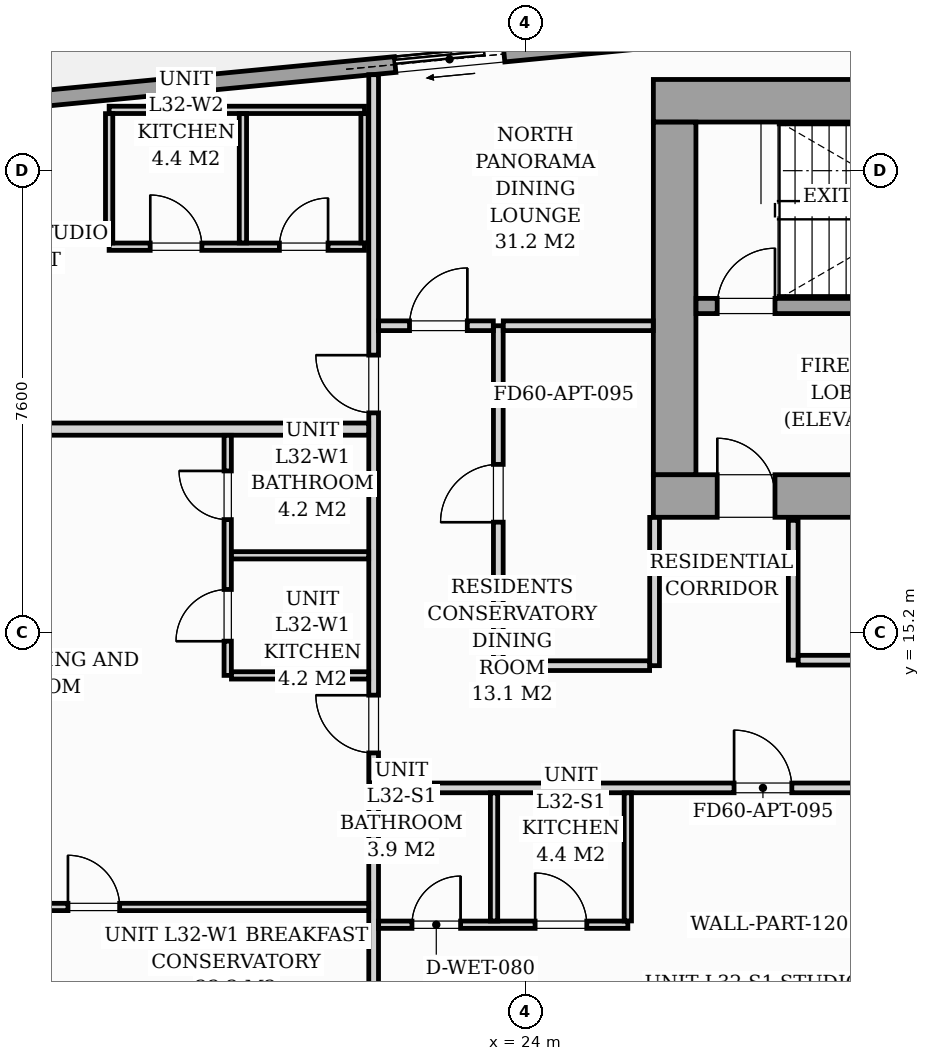
"""IFC4 building model, lengths in metres.
Left out: names, types, materials, properties, quantities, classifications, styles, units other than length and angle.
Written with IfcOpenShell. Run it as: python <this file> out.ifc"""

import sys

from ifc_helpers import new_model, si_unit, direction, frame, frame_2d, origin, origin_2d, place, context, subcontext, project, spatial, rectangle, i_section, extrude, source, transform, mapped, element, fill, save


model = new_model("IFC4")
c1 = context("Model", 3, precision=1e-05, world=origin(), true_north=direction((0.0, 1.0)))
c2 = subcontext(c1, "Body", "Model", "MODEL_VIEW")
j1 = project(units=[si_unit("LENGTHUNIT", "METRE"), si_unit("PLANEANGLEUNIT", "RADIAN")], contexts=[c1])
p1 = place(None, origin())
s1 = spatial("IfcSite", under=j1, at=p1, CompositionType="ELEMENT")
p2 = place(p1, origin())
s2 = spatial("IfcBuilding", under=s1, at=p2, CompositionType="ELEMENT")
p3 = place(p2, frame((0.0, 0.0, 113.0)))
s3 = spatial("IfcBuildingStorey", under=s2, at=p3, CompositionType="ELEMENT", Elevation=113.0)
m1 = source(origin(), c2, "Body", "SweptSolid", [
    extrude(i_section(OverallWidth=0.427, OverallDepth=0.483, WebThickness=0.051, FlangeThickness=0.082, FilletRadius=0.018, at=origin_2d()), origin(), (0.0, 0.0, 1.0), 3.196),
])
for number, where, z_axis, x_axis in (
    (1, (26.4, 17.4, 0.002), (0.0, 0.0, 1.0), (1.0, 0.0, 0.0)),
    (2, (26.4, 24.0, 0.002), (0.0, 0.0, 1.0), (1.0, 0.0, 0.0)),
):
    element("IfcColumn", number, at=place(p3, frame(where, z_axis=z_axis, x_axis=x_axis)), inside=s3, PredefinedType="PILASTER", context=c2, shape_type="MappedRepresentation", body=[
        mapped(m1, transform((0.0, 0.0, 0.0), scale=1.0)),
    ])
p4 = place(p3, frame((11.08, 23.508, 0.0), z_axis=(0.0, 0.0, 1.0), x_axis=(0.995396638587, 0.095841180552, 0.0)))
e3 = element("IfcWall", 3, at=p4, inside=s3, PredefinedType="STANDARD", context=c2, shape_type="SweptSolid", body=[
    extrude(rectangle(XDim=19.11, YDim=0.26, at=frame_2d((9.555, 0.0))), origin(), (0.0, 0.0, 1.0), 2.94),
])
p5 = place(p4, frame((10.823, 0.0, 0.0)))
e4 = element("IfcOpeningElement", 4, at=p5, cuts=e3, PredefinedType="OPENING", context=c2, shape_type="SweptSolid", body=[
    extrude(rectangle(XDim=1.8, YDim=2.06, at=frame_2d((0.9, 1.03))), frame((0.0, 0.14, 0.0), z_axis=(0.0, -1.0, 0.0), x_axis=(1.0, 0.0, 0.0)), (0.0, 0.0, 1.0), 0.28),
])
p6 = place(p4, frame((2.05, 0.0, 0.65)))
e5 = element("IfcOpeningElement", 5, at=p6, cuts=e3, PredefinedType="OPENING", context=c2, shape_type="SweptSolid", body=[
    extrude(rectangle(XDim=1.6, YDim=1.5, at=frame_2d((0.8, 0.75))), frame((0.0, 0.14, 0.0), z_axis=(0.0, -1.0, 0.0), x_axis=(1.0, 0.0, 0.0)), (0.0, 0.0, 1.0), 0.28),
])
p7 = place(p3, frame((26.1, 17.45, 0.0), z_axis=(0.0, 0.0, 1.0), x_axis=(1.0, 0.0, 0.0)))
e6 = element("IfcWall", 6, at=p7, inside=s3, PredefinedType="SHEAR", context=c2, shape_type="SweptSolid", body=[
    extrude(rectangle(XDim=19.8, YDim=0.7, at=frame_2d((9.9, 0.0))), origin(), (0.0, 0.0, 1.0), 3.2),
])
p8 = place(p7, frame((1.05, 0.0, 0.0)))
e7 = element("IfcOpeningElement", 7, at=p8, cuts=e6, PredefinedType="OPENING", context=c2, shape_type="SweptSolid", body=[
    extrude(rectangle(XDim=0.95, YDim=2.06, at=frame_2d((0.475, 1.03))), frame((0.0, 0.36, 0.0), z_axis=(0.0, -1.0, 0.0), x_axis=(1.0, 0.0, 0.0)), (0.0, 0.0, 1.0), 0.72),
])
p9 = place(p7, frame((9.48, 0.0, 0.0)))
e8 = element("IfcOpeningElement", 8, at=p9, cuts=e6, PredefinedType="OPENING", context=c2, shape_type="SweptSolid", body=[
    extrude(rectangle(XDim=0.85, YDim=2.0, at=frame_2d((0.425, 1.0))), frame((0.0, 0.36, 0.0), z_axis=(0.0, -1.0, 0.0), x_axis=(1.0, 0.0, 0.0)), (0.0, 0.0, 1.0), 0.72),
])
p10 = place(p7, frame((17.65, 0.0, 0.0)))
e9 = element("IfcOpeningElement", 9, at=p10, cuts=e6, PredefinedType="OPENING", context=c2, shape_type="SweptSolid", body=[
    extrude(rectangle(XDim=0.95, YDim=2.06, at=frame_2d((0.475, 1.03))), frame((0.0, 0.36, 0.0), z_axis=(0.0, -1.0, 0.0), x_axis=(1.0, 0.0, 0.0)), (0.0, 0.0, 1.0), 0.72),
])
p11 = place(p3, frame((26.1, 23.95, 0.0), z_axis=(0.0, 0.0, 1.0), x_axis=(1.0, 0.0, 0.0)))
e10 = element("IfcWall", 10, at=p11, inside=s3, PredefinedType="SHEAR", context=c2, shape_type="SweptSolid", body=[
    extrude(rectangle(XDim=19.8, YDim=0.7, at=frame_2d((9.9, 0.0))), origin(), (0.0, 0.0, 1.0), 3.2),
])
p12 = place(p3, frame((26.45, 17.802, 0.0), z_axis=(0.0, 0.0, 1.0), x_axis=(0.0, 1.0, 0.0)))
e11 = element("IfcWall", 11, at=p12, inside=s3, PredefinedType="SHEAR", context=c2, shape_type="SweptSolid", body=[
    extrude(rectangle(XDim=5.796, YDim=0.7, at=frame_2d((2.898, 0.0))), origin(), (0.0, 0.0, 1.0), 3.2),
])
p13 = place(p3, frame((26.802, 20.575, 0.0), z_axis=(0.0, 0.0, 1.0), x_axis=(1.0, 0.0, 0.0)))
e12 = element("IfcWall", 12, at=p13, inside=s3, PredefinedType="SOLIDWALL", context=c2, shape_type="SweptSolid", body=[
    extrude(rectangle(XDim=8.148, YDim=0.25, at=frame_2d((4.074, 0.0))), origin(), (0.0, 0.0, 1.0), 3.2),
])
p14 = place(p13, frame((0.348, 0.0, 0.0)))
e13 = element("IfcOpeningElement", 13, at=p14, cuts=e12, PredefinedType="OPENING", context=c2, shape_type="SweptSolid", body=[
    extrude(rectangle(XDim=0.95, YDim=2.06, at=frame_2d((0.475, 1.03))), frame((0.0, 0.135, 0.0), z_axis=(0.0, -1.0, 0.0), x_axis=(1.0, 0.0, 0.0)), (0.0, 0.0, 1.0), 0.27),
])
p15 = place(p3, frame((28.4, 14.75, 0.0), z_axis=(0.0, 0.0, 1.0), x_axis=(0.0, 1.0, 0.0)))
e14 = element("IfcWall", 14, at=p15, inside=s3, PredefinedType="PARTITIONING", context=c2, shape_type="SweptSolid", body=[
    extrude(rectangle(XDim=2.3, YDim=0.16, at=frame_2d((1.15, 0.0))), origin(), (0.0, 0.0, 1.0), 2.94),
])
p16 = place(p3, frame((28.482, 14.75, 0.0), z_axis=(0.0, 0.0, 1.0), x_axis=(1.0, 0.0, 0.0)))
e15 = element("IfcWall", 15, at=p16, inside=s3, PredefinedType="PARTITIONING", context=c2, shape_type="SweptSolid", body=[
    extrude(rectangle(XDim=4.516, YDim=0.16, at=frame_2d((2.258, 0.0))), origin(), (0.0, 0.0, 1.0), 2.94),
])
p17 = place(p16, frame((1.868, 0.0, 0.0)))
e16 = element("IfcOpeningElement", 16, at=p17, cuts=e15, PredefinedType="OPENING", context=c2, shape_type="SweptSolid", body=[
    extrude(rectangle(XDim=0.8, YDim=2.05, at=frame_2d((0.4, 1.025))), frame((0.0, 0.09, 0.0), z_axis=(0.0, -1.0, 0.0), x_axis=(1.0, 0.0, 0.0)), (0.0, 0.0, 1.0), 0.18),
])
p18 = place(p3, frame((21.5, 12.65, 0.0), z_axis=(0.0, 0.0, 1.0), x_axis=(1.0, 0.0, 0.0)))
e17 = element("IfcWall", 17, at=p18, inside=s3, PredefinedType="PARTITIONING", context=c2, shape_type="SweptSolid", body=[
    extrude(rectangle(XDim=26.2, YDim=0.16, at=frame_2d((13.1, 0.0))), origin(), (0.0, 0.0, 1.0), 2.94),
])
p19 = place(p18, frame((5.927, 0.0, 0.0)))
e18 = element("IfcOpeningElement", 18, at=p19, cuts=e17, PredefinedType="OPENING", context=c2, shape_type="SweptSolid", body=[
    extrude(rectangle(XDim=0.95, YDim=2.06, at=frame_2d((0.475, 1.03))), frame((0.0, 0.09, 0.0), z_axis=(0.0, -1.0, 0.0), x_axis=(1.0, 0.0, 0.0)), (0.0, 0.0, 1.0), 0.18),
])
p20 = place(p18, frame((10.575, 0.0, 0.0)))
e19 = element("IfcOpeningElement", 19, at=p20, cuts=e17, PredefinedType="OPENING", context=c2, shape_type="SweptSolid", body=[
    extrude(rectangle(XDim=0.95, YDim=2.06, at=frame_2d((0.475, 1.03))), frame((0.0, 0.09, 0.0), z_axis=(0.0, -1.0, 0.0), x_axis=(1.0, 0.0, 0.0)), (0.0, 0.0, 1.0), 0.18),
])
p21 = place(p18, frame((19.322, 0.0, 0.0)))
e20 = element("IfcOpeningElement", 20, at=p21, cuts=e17, PredefinedType="OPENING", context=c2, shape_type="SweptSolid", body=[
    extrude(rectangle(XDim=0.95, YDim=2.06, at=frame_2d((0.475, 1.03))), frame((0.0, 0.09, 0.0), z_axis=(0.0, -1.0, 0.0), x_axis=(1.0, 0.0, 0.0)), (0.0, 0.0, 1.0), 0.18),
])
p22 = place(p3, frame((21.5, 4.812, 0.0), z_axis=(0.0, 0.0, 1.0), x_axis=(0.0, 1.0, 0.0)))
e21 = element("IfcWall", 21, at=p22, inside=s3, PredefinedType="PARTITIONING", context=c2, shape_type="SweptSolid", body=[
    extrude(rectangle(XDim=7.756, YDim=0.16, at=frame_2d((3.878, 0.0))), origin(), (0.0, 0.0, 1.0), 2.94),
])
p23 = place(p3, frame((21.5, 12.732, 0.0), z_axis=(0.0, 0.0, 1.0), x_axis=(0.0, 1.0, 0.0)))
e22 = element("IfcWall", 22, at=p23, inside=s3, PredefinedType="PARTITIONING", context=c2, shape_type="SweptSolid", body=[
    extrude(rectangle(XDim=11.647, YDim=0.16, at=frame_2d((5.823, 0.0))), origin(), (0.0, 0.0, 1.0), 2.94),
])
p24 = place(p23, frame((0.493, 0.0, 0.0)))
e23 = element("IfcOpeningElement", 23, at=p24, cuts=e22, PredefinedType="OPENING", context=c2, shape_type="SweptSolid", body=[
    extrude(rectangle(XDim=0.95, YDim=2.06, at=frame_2d((0.475, 1.03))), frame((0.0, 0.09, 0.0), z_axis=(0.0, -1.0, 0.0), x_axis=(1.0, 0.0, 0.0)), (0.0, 0.0, 1.0), 0.18),
])
p25 = place(p23, frame((6.085, 0.0, 0.0)))
e24 = element("IfcOpeningElement", 24, at=p25, cuts=e22, PredefinedType="OPENING", context=c2, shape_type="SweptSolid", body=[
    extrude(rectangle(XDim=0.95, YDim=2.06, at=frame_2d((0.475, 1.03))), frame((0.0, 0.09, 0.0), z_axis=(0.0, -1.0, 0.0), x_axis=(1.0, 0.0, 0.0)), (0.0, 0.0, 1.0), 0.18),
])
p26 = place(p3, frame((21.582, 10.4, 0.0), z_axis=(0.0, 0.0, 1.0), x_axis=(1.0, 0.0, 0.0)))
e25 = element("IfcWall", 25, at=p26, inside=s3, PredefinedType="PARTITIONING", context=c2, shape_type="SweptSolid", body=[
    extrude(rectangle(XDim=4.098, YDim=0.12, at=frame_2d((2.049, 0.0))), origin(), (0.0, 0.0, 1.0), 2.94),
])
p27 = place(p26, frame((0.548, 0.0, 0.0)))
e26 = element("IfcOpeningElement", 26, at=p27, cuts=e25, PredefinedType="OPENING", context=c2, shape_type="SweptSolid", body=[
    extrude(rectangle(XDim=0.8, YDim=2.02, at=frame_2d((0.4, 1.01))), frame((0.0, 0.07, 0.0), z_axis=(0.0, -1.0, 0.0), x_axis=(1.0, 0.0, 0.0)), (0.0, 0.0, 1.0), 0.14),
])
p28 = place(p26, frame((2.573, 0.0, 0.0)))
e27 = element("IfcOpeningElement", 27, at=p28, cuts=e25, PredefinedType="OPENING", context=c2, shape_type="SweptSolid", body=[
    extrude(rectangle(XDim=0.85, YDim=2.05, at=frame_2d((0.425, 1.025))), frame((0.0, 0.07, 0.0), z_axis=(0.0, -1.0, 0.0), x_axis=(1.0, 0.0, 0.0)), (0.0, 0.0, 1.0), 0.14),
])
for number, where, z_axis, x_axis in (
    (28, (25.68, 10.462, 0.0), (0.0, 0.0, 1.0), (0.0, 1.0, 0.0)),
    (29, (23.48, 10.462, 0.0), (0.0, 0.0, 1.0), (0.0, 1.0, 0.0)),
):
    element("IfcWall", number, at=place(p3, frame(where, z_axis=z_axis, x_axis=x_axis)), inside=s3, PredefinedType="PARTITIONING", context=c2, shape_type="SweptSolid", body=[
        extrude(rectangle(XDim=2.106, YDim=0.12, at=frame_2d((1.053, 0.0))), origin(), (0.0, 0.0, 1.0), 2.94),
    ])
p29 = place(p3, frame((9.126, 18.55, 0.0), z_axis=(0.0, 0.0, 1.0), x_axis=(1.0, 0.0, 0.0)))
e30 = element("IfcWall", 30, at=p29, inside=s3, PredefinedType="PARTITIONING", context=c2, shape_type="SweptSolid", body=[
    extrude(rectangle(XDim=12.292, YDim=0.2, at=frame_2d((6.146, 0.0))), origin(), (0.0, 0.0, 1.0), 2.94),
])
p30 = place(p3, frame((19.1, 14.5, 0.0), z_axis=(0.0, 0.0, 1.0), x_axis=(0.0, 1.0, 0.0)))
e31 = element("IfcWall", 31, at=p30, inside=s3, PredefinedType="PARTITIONING", context=c2, shape_type="SweptSolid", body=[
    extrude(rectangle(XDim=3.948, YDim=0.12, at=frame_2d((1.974, 0.0))), origin(), (0.0, 0.0, 1.0), 2.94),
])
p31 = place(p30, frame((0.563, 0.0, 0.0)))
e32 = element("IfcOpeningElement", 32, at=p31, cuts=e31, PredefinedType="OPENING", context=c2, shape_type="SweptSolid", body=[
    extrude(rectangle(XDim=0.85, YDim=2.05, at=frame_2d((0.425, 1.025))), frame((0.0, 0.07, 0.0), z_axis=(0.0, -1.0, 0.0), x_axis=(1.0, 0.0, 0.0)), (0.0, 0.0, 1.0), 0.14),
])
p32 = place(p30, frame((2.562, 0.0, 0.0)))
e33 = element("IfcOpeningElement", 33, at=p32, cuts=e31, PredefinedType="OPENING", context=c2, shape_type="SweptSolid", body=[
    extrude(rectangle(XDim=0.8, YDim=2.02, at=frame_2d((0.4, 1.01))), frame((0.0, 0.07, 0.0), z_axis=(0.0, -1.0, 0.0), x_axis=(1.0, 0.0, 0.0)), (0.0, 0.0, 1.0), 0.14),
])
for number, where, z_axis, x_axis in (
    (34, (19.162, 16.475, 0.0), (0.0, 0.0, 1.0), (1.0, 0.0, 0.0)),
    (35, (19.162, 14.5, 0.0), (0.0, 0.0, 1.0), (1.0, 0.0, 0.0)),
):
    element("IfcWall", number, at=place(p3, frame(where, z_axis=z_axis, x_axis=x_axis)), inside=s3, PredefinedType="PARTITIONING", context=c2, shape_type="SweptSolid", body=[
        extrude(rectangle(XDim=2.256, YDim=0.12, at=frame_2d((1.128, 0.0))), origin(), (0.0, 0.0, 1.0), 2.94),
    ])
p33 = place(p3, frame((12.377, 10.692, 0.0), z_axis=(0.0, 0.0, 1.0), x_axis=(1.0, 0.0, 0.0)))
e36 = element("IfcWall", 36, at=p33, inside=s3, PredefinedType="PARTITIONING", context=c2, shape_type="SweptSolid", body=[
    extrude(rectangle(XDim=9.041, YDim=0.12, at=frame_2d((4.521, 0.0))), origin(), (0.0, 0.0, 1.0), 2.94),
])
p34 = place(p33, frame((4.096, 0.0, 0.0)))
e37 = element("IfcOpeningElement", 37, at=p34, cuts=e36, PredefinedType="OPENING", context=c2, shape_type="SweptSolid", body=[
    extrude(rectangle(XDim=0.85, YDim=2.05, at=frame_2d((0.425, 1.025))), frame((0.0, 0.07, 0.0), z_axis=(0.0, -1.0, 0.0), x_axis=(1.0, 0.0, 0.0)), (0.0, 0.0, 1.0), 0.14),
])
p35 = place(p3, frame((17.15, 21.55, 0.0), z_axis=(0.0, 0.0, 1.0), x_axis=(1.0, 0.0, 0.0)))
e38 = element("IfcWall", 38, at=p35, inside=s3, PredefinedType="PARTITIONING", context=c2, shape_type="SweptSolid", body=[
    extrude(rectangle(XDim=4.2, YDim=0.12, at=frame_2d((2.1, 0.0))), origin(), (0.0, 0.0, 1.0), 2.94),
])
p36 = place(p35, frame((0.675, 0.0, 0.0)))
e39 = element("IfcOpeningElement", 39, at=p36, cuts=e38, PredefinedType="OPENING", context=c2, shape_type="SweptSolid", body=[
    extrude(rectangle(XDim=0.85, YDim=2.05, at=frame_2d((0.425, 1.025))), frame((0.0, 0.07, 0.0), z_axis=(0.0, -1.0, 0.0), x_axis=(1.0, 0.0, 0.0)), (0.0, 0.0, 1.0), 0.14),
])
p37 = place(p35, frame((2.8, 0.0, 0.0)))
e40 = element("IfcOpeningElement", 40, at=p37, cuts=e38, PredefinedType="OPENING", context=c2, shape_type="SweptSolid", body=[
    extrude(rectangle(XDim=0.8, YDim=2.02, at=frame_2d((0.4, 1.01))), frame((0.0, 0.07, 0.0), z_axis=(0.0, -1.0, 0.0), x_axis=(1.0, 0.0, 0.0)), (0.0, 0.0, 1.0), 0.14),
])
p38 = place(p3, frame((17.15, 23.8, 0.0), z_axis=(0.0, 0.0, 1.0), x_axis=(1.0, 0.0, 0.0)))
e41 = element("IfcWall", 41, at=p38, inside=s3, PredefinedType="PARTITIONING", context=c2, shape_type="SweptSolid", body=[
    extrude(rectangle(XDim=4.2, YDim=0.12, at=frame_2d((2.1, 0.0))), origin(), (0.0, 0.0, 1.0), 2.31),
])
for number, where, z_axis, x_axis in (
    (42, (17.15, 21.612, 0.0), (0.0, 0.0, 1.0), (0.0, 1.0, 0.0)),
    (43, (19.35, 21.612, 0.0), (0.0, 0.0, 1.0), (0.0, 1.0, 0.0)),
    (44, (21.35, 21.612, 0.0), (0.0, 0.0, 1.0), (0.0, 1.0, 0.0)),
):
    element("IfcWall", number, at=place(p3, frame(where, z_axis=z_axis, x_axis=x_axis)), inside=s3, PredefinedType="PARTITIONING", context=c2, shape_type="SweptSolid", body=[
        extrude(rectangle(XDim=2.126, YDim=0.12, at=frame_2d((1.063, 0.0))), origin(), (0.0, 0.0, 1.0), 2.94),
    ])
p39 = place(p3, frame((23.55, 14.66, 0.0), z_axis=(0.0, 0.0, 1.0), x_axis=(0.0, 1.0, 0.0)))
e45 = element("IfcWall", 45, at=p39, inside=s3, PredefinedType="PARTITIONING", context=c2, shape_type="SweptSolid", body=[
    extrude(rectangle(XDim=5.59, YDim=0.16, at=frame_2d((2.795, 0.0))), origin(), (0.0, 0.0, 1.0), 2.94),
])
p40 = place(p39, frame((2.36, 0.0, 0.0)))
e46 = element("IfcOpeningElement", 46, at=p40, cuts=e45, PredefinedType="OPENING", context=c2, shape_type="SweptSolid", body=[
    extrude(rectangle(XDim=0.95, YDim=2.06, at=frame_2d((0.475, 1.03))), frame((0.0, 0.09, 0.0), z_axis=(0.0, -1.0, 0.0), x_axis=(1.0, 0.0, 0.0)), (0.0, 0.0, 1.0), 0.18),
])
p41 = place(p3, frame((21.582, 20.25, 0.0), z_axis=(0.0, 0.0, 1.0), x_axis=(1.0, 0.0, 0.0)))
e47 = element("IfcWall", 47, at=p41, inside=s3, PredefinedType="PARTITIONING", context=c2, shape_type="SweptSolid", body=[
    extrude(rectangle(XDim=1.886, YDim=0.16, at=frame_2d((0.943, 0.0))), origin(), (0.0, 0.0, 1.0), 2.94),
])
p42 = place(p41, frame((0.508, 0.0, 0.0)))
e48 = element("IfcOpeningElement", 48, at=p42, cuts=e47, PredefinedType="OPENING", context=c2, shape_type="SweptSolid", body=[
    extrude(rectangle(XDim=0.95, YDim=2.06, at=frame_2d((0.475, 1.03))), frame((0.0, 0.09, 0.0), z_axis=(0.0, -1.0, 0.0), x_axis=(1.0, 0.0, 0.0)), (0.0, 0.0, 1.0), 0.18),
])
p43 = place(p3, frame((23.632, 20.25, 0.0), z_axis=(0.0, 0.0, 1.0), x_axis=(1.0, 0.0, 0.0)))
e49 = element("IfcWall", 49, at=p43, inside=s3, PredefinedType="PARTITIONING", context=c2, shape_type="SweptSolid", body=[
    extrude(rectangle(XDim=2.466, YDim=0.16, at=frame_2d((1.233, 0.0))), origin(), (0.0, 0.0, 1.0), 2.94),
])
p44 = place(p3, frame((26.12, 14.66, 0.0), z_axis=(0.0, 0.0, 1.0), x_axis=(0.0, 1.0, 0.0)))
e50 = element("IfcWall", 50, at=p44, inside=s3, PredefinedType="PARTITIONING", context=c2, shape_type="SweptSolid", body=[
    extrude(rectangle(XDim=2.438, YDim=0.16, at=frame_2d((1.219, 0.0))), origin(), (0.0, 0.0, 1.0), 2.94),
])
p45 = place(p3, frame((23.632, 14.66, 0.0), z_axis=(0.0, 0.0, 1.0), x_axis=(1.0, 0.0, 0.0)))
e51 = element("IfcWall", 51, at=p45, inside=s3, PredefinedType="PARTITIONING", context=c2, shape_type="SweptSolid", body=[
    extrude(rectangle(XDim=2.406, YDim=0.16, at=frame_2d((1.203, 0.0))), origin(), (0.0, 0.0, 1.0), 2.94),
])
m2 = source(origin(), c2, "Body", "SweptSolid", [
    extrude(rectangle(XDim=1.8, YDim=2.06, at=frame_2d((0.9, 1.03))), frame((0.0, 0.025, 0.0), z_axis=(0.0, -1.0, 0.0), x_axis=(1.0, 0.0, 0.0)), (0.0, 0.0, 1.0), 0.05),
])
p46 = place(p5, origin())
e52 = element("IfcDoor", 52, at=p46, inside=s3, OperationType="SLIDING_TO_LEFT", PredefinedType="DOOR", context=c2, shape_type="MappedRepresentation", body=[
    mapped(m2, transform((0.0, 0.0, 0.0), scale=1.0)),
])
fill(e4, e52)
m3 = source(origin(), c2, "Body", "SweptSolid", [
    extrude(rectangle(XDim=0.95, YDim=2.06, at=frame_2d((0.475, 1.03))), frame((0.0, 0.025, 0.0), z_axis=(0.0, -1.0, 0.0), x_axis=(1.0, 0.0, 0.0)), (0.0, 0.0, 1.0), 0.05),
])
p47 = place(p8, origin())
e53 = element("IfcDoor", 53, at=p47, inside=s3, OperationType="SINGLE_SWING_LEFT", PredefinedType="DOOR", context=c2, shape_type="MappedRepresentation", body=[
    mapped(m3, transform((0.0, 0.0, 0.0), scale=1.0)),
])
fill(e7, e53)
p48 = place(p14, origin())
e54 = element("IfcDoor", 54, at=p48, inside=s3, OperationType="SINGLE_SWING_RIGHT", PredefinedType="DOOR", context=c2, shape_type="MappedRepresentation", body=[
    mapped(m3, transform((0.0, 0.0, 0.0), scale=1.0)),
])
fill(e13, e54)
m4 = source(origin(), c2, "Body", "SweptSolid", [
    extrude(rectangle(XDim=0.95, YDim=2.06, at=frame_2d((0.475, 1.03))), frame((0.0, 0.025, 0.0), z_axis=(0.0, -1.0, 0.0), x_axis=(1.0, 0.0, 0.0)), (0.0, 0.0, 1.0), 0.05),
])
p49 = place(p19, origin())
e55 = element("IfcDoor", 55, at=p49, inside=s3, OperationType="SINGLE_SWING_LEFT", PredefinedType="DOOR", context=c2, shape_type="MappedRepresentation", body=[
    mapped(m4, transform((0.0, 0.0, 0.0), scale=1.0)),
])
fill(e18, e55)
m5 = source(origin(), c2, "Body", "SweptSolid", [
    extrude(rectangle(XDim=0.8, YDim=2.02, at=frame_2d((0.4, 1.01))), frame((0.0, 0.025, 0.0), z_axis=(0.0, -1.0, 0.0), x_axis=(1.0, 0.0, 0.0)), (0.0, 0.0, 1.0), 0.05),
])
p50 = place(p27, origin())
e56 = element("IfcDoor", 56, at=p50, inside=s3, OperationType="SINGLE_SWING_RIGHT", PredefinedType="DOOR", context=c2, shape_type="MappedRepresentation", body=[
    mapped(m5, transform((0.0, 0.0, 0.0), scale=1.0)),
])
fill(e26, e56)
m6 = source(origin(), c2, "Body", "SweptSolid", [
    extrude(rectangle(XDim=0.85, YDim=2.05, at=frame_2d((0.425, 1.025))), frame((0.0, 0.025, 0.0), z_axis=(0.0, -1.0, 0.0), x_axis=(1.0, 0.0, 0.0)), (0.0, 0.0, 1.0), 0.05),
])
p51 = place(p28, origin())
e57 = element("IfcDoor", 57, at=p51, inside=s3, OperationType="SINGLE_SWING_LEFT", PredefinedType="DOOR", context=c2, shape_type="MappedRepresentation", body=[
    mapped(m6, transform((0.0, 0.0, 0.0), scale=1.0)),
])
fill(e27, e57)
p52 = place(p24, origin())
e58 = element("IfcDoor", 58, at=p52, inside=s3, OperationType="SINGLE_SWING_RIGHT", PredefinedType="DOOR", context=c2, shape_type="MappedRepresentation", body=[
    mapped(m4, transform((0.0, 0.0, 0.0), scale=1.0)),
])
fill(e23, e58)
p53 = place(p31, origin())
e59 = element("IfcDoor", 59, at=p53, inside=s3, OperationType="SINGLE_SWING_LEFT", PredefinedType="DOOR", context=c2, shape_type="MappedRepresentation", body=[
    mapped(m6, transform((0.0, 0.0, 0.0), scale=1.0)),
])
fill(e32, e59)
p54 = place(p32, origin())
e60 = element("IfcDoor", 60, at=p54, inside=s3, OperationType="SINGLE_SWING_RIGHT", PredefinedType="DOOR", context=c2, shape_type="MappedRepresentation", body=[
    mapped(m5, transform((0.0, 0.0, 0.0), scale=1.0)),
])
fill(e33, e60)
p55 = place(p34, origin())
e61 = element("IfcDoor", 61, at=p55, inside=s3, OperationType="SINGLE_SWING_LEFT", PredefinedType="DOOR", context=c2, shape_type="MappedRepresentation", body=[
    mapped(m6, transform((0.0, 0.0, 0.0), scale=1.0)),
])
fill(e37, e61)
p56 = place(p25, origin())
e62 = element("IfcDoor", 62, at=p56, inside=s3, OperationType="SINGLE_SWING_RIGHT", PredefinedType="DOOR", context=c2, shape_type="MappedRepresentation", body=[
    mapped(m4, transform((0.0, 0.0, 0.0), scale=1.0)),
])
fill(e24, e62)
p57 = place(p36, origin())
e63 = element("IfcDoor", 63, at=p57, inside=s3, OperationType="SINGLE_SWING_LEFT", PredefinedType="DOOR", context=c2, shape_type="MappedRepresentation", body=[
    mapped(m6, transform((0.0, 0.0, 0.0), scale=1.0)),
])
fill(e39, e63)
p58 = place(p37, origin())
e64 = element("IfcDoor", 64, at=p58, inside=s3, OperationType="SINGLE_SWING_RIGHT", PredefinedType="DOOR", context=c2, shape_type="MappedRepresentation", body=[
    mapped(m5, transform((0.0, 0.0, 0.0), scale=1.0)),
])
fill(e40, e64)
p59 = place(p40, origin())
e65 = element("IfcDoor", 65, at=p59, inside=s3, OperationType="SINGLE_SWING_LEFT", PredefinedType="DOOR", context=c2, shape_type="MappedRepresentation", body=[
    mapped(m4, transform((0.0, 0.0, 0.0), scale=1.0)),
])
fill(e46, e65)
p60 = place(p42, origin())
e66 = element("IfcDoor", 66, at=p60, inside=s3, OperationType="SINGLE_SWING_RIGHT", PredefinedType="DOOR", context=c2, shape_type="MappedRepresentation", body=[
    mapped(m4, transform((0.0, 0.0, 0.0), scale=1.0)),
])
fill(e48, e66)
save(model, sys.argv[1])
